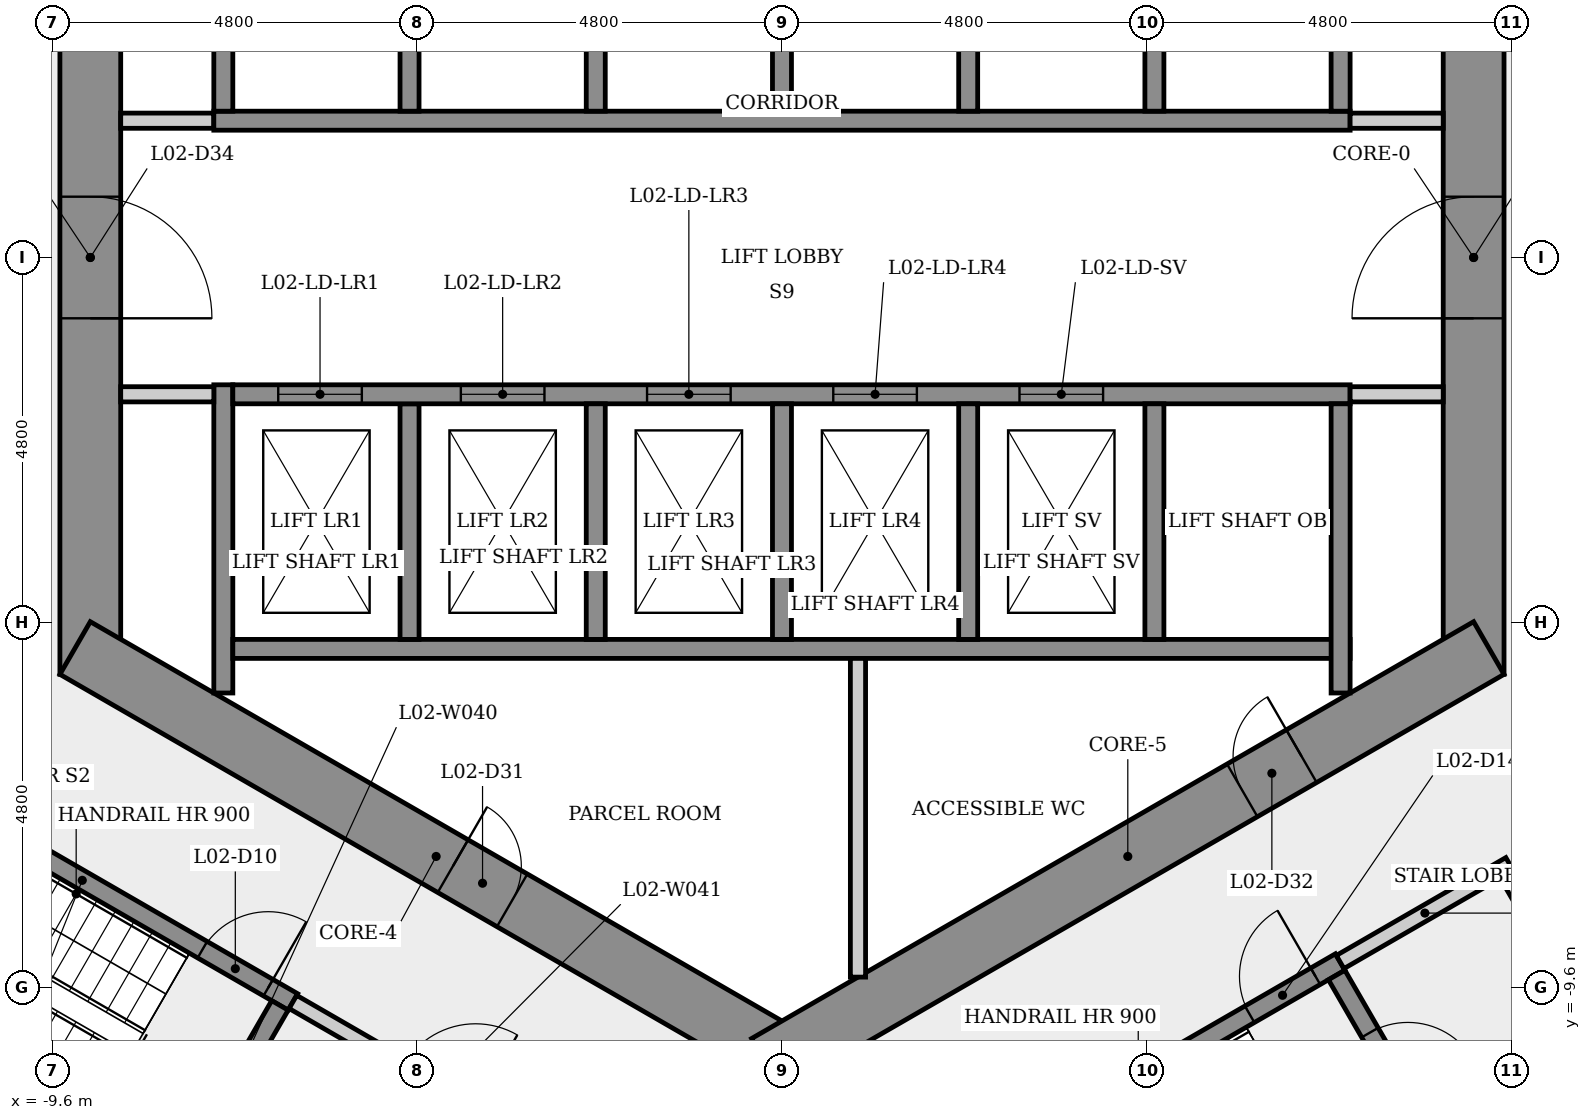
"""IFC4 building model, lengths in metres.
Left out: names, types, materials, properties, quantities, classifications, styles, units other than length and angle.
Written with IfcOpenShell. Run it as: python <this file> out.ifc"""

import sys

from ifc_helpers import new_model, si_unit, direction, frame, frame_2d, origin, place, context, subcontext, project, spatial, rectangle, extrude, element, fill, save


model = new_model("IFC4")
c1 = context("Model", 3, precision=1e-05, world=origin(), true_north=direction((0.0, 1.0)))
c2 = subcontext(c1, "Body", "Model", "MODEL_VIEW")
j1 = project(units=[si_unit("LENGTHUNIT", "METRE"), si_unit("PLANEANGLEUNIT", "RADIAN")], contexts=[c1])
p1 = place(None, origin())
s1 = spatial("IfcSite", under=j1, at=p1, CompositionType="ELEMENT")
p2 = place(p1, origin())
s2 = spatial("IfcBuilding", under=s1, at=p2, CompositionType="ELEMENT")
p3 = place(p2, frame((0.0, 0.0, 11.5)))
s3 = spatial("IfcBuildingStorey", under=s2, at=p3, CompositionType="ELEMENT", Elevation=11.5)
p4 = place(p3, frame((9.1, -5.485, 0.0), z_axis=(0.0, 0.0, 1.0), x_axis=(0.0, 1.0, 0.0)))
e1 = element("IfcWall", 1, at=p4, inside=s3, PredefinedType="SHEAR", context=c2, shape_type="SweptSolid", body=[
    extrude(rectangle(XDim=10.97, YDim=0.8, at=frame_2d((5.485, 0.0))), origin(), (0.0, 0.0, 1.0), 4.5),
])
p5 = place(p4, frame((4.685, 0.0, 0.0)))
e2 = element("IfcOpeningElement", 2, at=p5, cuts=e1, PredefinedType="OPENING", context=c2, shape_type="SweptSolid", body=[
    extrude(rectangle(XDim=1.6, YDim=2.1, at=frame_2d((0.8, 1.05))), frame((0.0, 0.41, 0.0), z_axis=(0.0, -1.0, 0.0), x_axis=(1.0, 0.0, 0.0)), (0.0, 0.0, 1.0), 0.82),
])
p6 = place(p3, frame((-9.1, 5.485, 0.0), z_axis=(0.0, 0.0, 1.0), x_axis=(0.0, -1.0, 0.0)))
e3 = element("IfcWall", 3, at=p6, inside=s3, PredefinedType="SHEAR", context=c2, shape_type="SweptSolid", body=[
    extrude(rectangle(XDim=10.97, YDim=0.8, at=frame_2d((5.485, 0.0))), origin(), (0.0, 0.0, 1.0), 4.5),
])
p7 = place(p6, frame((4.685, 0.0, 0.0)))
e4 = element("IfcOpeningElement", 4, at=p7, cuts=e3, PredefinedType="OPENING", context=c2, shape_type="SweptSolid", body=[
    extrude(rectangle(XDim=1.6, YDim=2.1, at=frame_2d((0.8, 1.05))), frame((0.0, 0.41, 0.0), z_axis=(0.0, -1.0, 0.0), x_axis=(1.0, 0.0, 0.0)), (0.0, 0.0, 1.0), 0.82),
])
p8 = place(p3, frame((-9.3, -5.138, 0.0), z_axis=(0.0, 0.0, 1.0), x_axis=(0.866023993627, -0.500002442456, 0.0)))
e5 = element("IfcWall", 5, at=p8, inside=s3, PredefinedType="SHEAR", context=c2, shape_type="SweptSolid", body=[
    extrude(rectangle(XDim=10.97, YDim=0.8, at=frame_2d((5.485, 0.0))), origin(), (0.0, 0.0, 1.0), 4.5),
])
p9 = place(p8, frame((5.74, 0.0, 0.0)))
e6 = element("IfcOpeningElement", 6, at=p9, cuts=e5, PredefinedType="OPENING", context=c2, shape_type="SweptSolid", body=[
    extrude(rectangle(XDim=0.9, YDim=2.1, at=frame_2d((0.45, 1.05))), frame((0.0, 0.41, 0.0), z_axis=(0.0, -1.0, 0.0), x_axis=(1.0, 0.0, 0.0)), (0.0, 0.0, 1.0), 0.82),
])
p10 = place(p3, frame((-0.2, -10.623, 0.0), z_axis=(0.0, 0.0, 1.0), x_axis=(0.866023993627, 0.500002442456, 0.0)))
e7 = element("IfcWall", 7, at=p10, inside=s3, PredefinedType="SHEAR", context=c2, shape_type="SweptSolid", body=[
    extrude(rectangle(XDim=10.97, YDim=0.8, at=frame_2d((5.485, 0.0))), origin(), (0.0, 0.0, 1.0), 4.5),
])
p11 = place(p10, frame((7.224, 0.0, 0.0)))
e8 = element("IfcOpeningElement", 8, at=p11, cuts=e7, PredefinedType="OPENING", context=c2, shape_type="SweptSolid", body=[
    extrude(rectangle(XDim=0.9, YDim=2.1, at=frame_2d((0.45, 1.05))), frame((0.0, 0.41, 0.0), z_axis=(0.0, -1.0, 0.0), x_axis=(1.0, 0.0, 0.0)), (0.0, 0.0, 1.0), 0.82),
])
p12 = place(p3, frame((-11.977, -6.595, 0.0), z_axis=(0.0, 0.0, 1.0), x_axis=(0.866025499775, -0.499999833739, 0.0)))
e9 = element("IfcWall", 9, at=p12, inside=s3, PredefinedType="SHEAR", context=c2, shape_type="SweptSolid", body=[
    extrude(rectangle(XDim=6.4, YDim=0.25, at=frame_2d((3.2, 0.0))), origin(), (0.0, 0.0, 1.0), 4.1),
])
p13 = place(p12, frame((5.025, 0.0, 0.0)))
e10 = element("IfcOpeningElement", 10, at=p13, cuts=e9, PredefinedType="OPENING", context=c2, shape_type="SweptSolid", body=[
    extrude(rectangle(XDim=1.0, YDim=2.1, at=frame_2d((0.5, 1.05))), frame((0.0, 0.135, 0.0), z_axis=(0.0, -1.0, 0.0), x_axis=(1.0, 0.0, 0.0)), (0.0, 0.0, 1.0), 0.27),
])
p14 = place(p3, frame((-8.7, 1.8, 0.0), z_axis=(0.0, 0.0, 1.0), x_axis=(1.0, 0.0, 0.0)))
e11 = element("IfcWall", 11, at=p14, inside=s3, PredefinedType="PARTITIONING", context=c2, shape_type="SweptSolid", body=[
    extrude(rectangle(XDim=1.225, YDim=0.2, at=frame_2d((0.613, 0.0))), origin(), (0.0, 0.0, 1.0), 4.1),
])
p15 = place(p3, frame((-7.935, -12.393, 0.0), z_axis=(0.0, 0.0, 1.0), x_axis=(-0.866025499775, 0.499999833739, 0.0)))
e12 = element("IfcWall", 12, at=p15, inside=s3, PredefinedType="SHEAR", context=c2, shape_type="SweptSolid", body=[
    extrude(rectangle(XDim=6.4, YDim=0.25, at=frame_2d((3.2, 0.0))), origin(), (0.0, 0.0, 1.0), 4.1),
])
p16 = place(p3, frame((-7.475, 1.8, 0.0), z_axis=(0.0, 0.0, 1.0), x_axis=(1.0, 0.0, 0.0)))
e13 = element("IfcWall", 13, at=p16, inside=s3, PredefinedType="SHEAR", context=c2, shape_type="SweptSolid", body=[
    extrude(rectangle(XDim=14.95, YDim=0.25, at=frame_2d((7.475, 0.0))), origin(), (0.0, 0.0, 1.0), 4.1),
])
p17 = place(p3, frame((-7.35, -5.73, 0.0), z_axis=(0.0, 0.0, 1.0), x_axis=(0.0, 1.0, 0.0)))
e14 = element("IfcWall", 14, at=p17, inside=s3, PredefinedType="SHEAR", context=c2, shape_type="SweptSolid", body=[
    extrude(rectangle(XDim=4.055, YDim=0.25, at=frame_2d((2.028, 0.0))), origin(), (0.0, 0.0, 1.0), 4.1),
])
p18 = place(p3, frame((-7.35, 1.925, 0.0), z_axis=(0.0, 0.0, 1.0), x_axis=(0.0, 1.0, 0.0)))
e15 = element("IfcWall", 15, at=p18, inside=s3, PredefinedType="SHEAR", context=c2, shape_type="SweptSolid", body=[
    extrude(rectangle(XDim=3.805, YDim=0.25, at=frame_2d((1.903, 0.0))), origin(), (0.0, 0.0, 1.0), 4.1),
])
p19 = place(p3, frame((-7.475, -1.8, 0.0), z_axis=(0.0, 0.0, 1.0), x_axis=(-1.0, 0.0, 0.0)))
e16 = element("IfcWall", 16, at=p19, inside=s3, PredefinedType="PARTITIONING", context=c2, shape_type="SweptSolid", body=[
    extrude(rectangle(XDim=1.225, YDim=0.2, at=frame_2d((0.613, 0.0))), origin(), (0.0, 0.0, 1.0), 4.1),
])
p20 = place(p3, frame((-6.605, -9.841, 0.0), z_axis=(0.0, 0.0, 1.0), x_axis=(-0.499996545922, -0.866027397988, 0.0)))
e17 = element("IfcWall", 17, at=p20, inside=s3, PredefinedType="SHEAR", context=c2, shape_type="SweptSolid", body=[
    extrude(rectangle(XDim=2.75, YDim=0.25, at=frame_2d((1.375, 0.0))), origin(), (0.0, 0.0, 1.0), 4.1),
])
p21 = place(p20, frame((0.875, 0.0, 0.0)))
e18 = element("IfcOpeningElement", 18, at=p21, cuts=e17, PredefinedType="OPENING", context=c2, shape_type="SweptSolid", body=[
    extrude(rectangle(XDim=1.0, YDim=2.1, at=frame_2d((0.5, 1.05))), frame((0.0, 0.135, 0.0), z_axis=(0.0, -1.0, 0.0), x_axis=(1.0, 0.0, 0.0)), (0.0, 0.0, 1.0), 0.27),
])
p22 = place(p3, frame((-6.435, -9.795, 0.0), z_axis=(0.0, 0.0, 1.0), x_axis=(0.866012907634, -0.500021643343, 0.0)))
e19 = element("IfcWall", 19, at=p22, inside=s3, PredefinedType="PARTITIONING", context=c2, shape_type="SweptSolid", body=[
    extrude(rectangle(XDim=4.45, YDim=0.2, at=frame_2d((2.225, 0.0))), origin(), (0.0, 0.0, 1.0), 4.1),
])
p23 = place(p22, frame((1.675, 0.0, 0.0)))
e20 = element("IfcOpeningElement", 20, at=p23, cuts=e19, PredefinedType="OPENING", context=c2, shape_type="SweptSolid", body=[
    extrude(rectangle(XDim=1.1, YDim=2.1, at=frame_2d((0.55, 1.05))), frame((0.0, 0.11, 0.0), z_axis=(0.0, -1.0, 0.0), x_axis=(1.0, 0.0, 0.0)), (0.0, 0.0, 1.0), 0.22),
])
p24 = place(p3, frame((-7.225, -5.15, 0.0), z_axis=(0.0, 0.0, 1.0), x_axis=(1.0, 0.0, 0.0)))
e21 = element("IfcWall", 21, at=p24, inside=s3, PredefinedType="SHEAR", context=c2, shape_type="SweptSolid", body=[
    extrude(rectangle(XDim=14.7, YDim=0.25, at=frame_2d((7.35, 0.0))), origin(), (0.0, 0.0, 1.0), 4.1),
])
for number, where, z_axis, x_axis in (
    (22, (-4.9, -1.925, 0.0), (0.0, 0.0, 1.0), (0.0, -1.0, 0.0)),
    (23, (-4.9, 5.025, 0.0), (0.0, 0.0, 1.0), (0.0, -1.0, 0.0)),
):
    element("IfcWall", number, at=place(p3, frame(where, z_axis=z_axis, x_axis=x_axis)), inside=s3, PredefinedType="SHEAR", context=c2, shape_type="SweptSolid", body=[
        extrude(rectangle(XDim=3.1, YDim=0.25, at=frame_2d((1.55, 0.0))), origin(), (0.0, 0.0, 1.0), 4.5),
    ])
p25 = place(p3, frame((-7.225, -1.8, 0.0), z_axis=(0.0, 0.0, 1.0), x_axis=(1.0, 0.0, 0.0)))
e24 = element("IfcWall", 24, at=p25, inside=s3, PredefinedType="SHEAR", context=c2, shape_type="SweptSolid", body=[
    extrude(rectangle(XDim=14.7, YDim=0.25, at=frame_2d((7.35, 0.0))), origin(), (0.0, 0.0, 1.0), 4.1),
])
p26 = place(p25, frame((0.597, 0.0, 0.0)))
e25 = element("IfcOpeningElement", 25, at=p26, cuts=e24, PredefinedType="OPENING", context=c2, shape_type="SweptSolid", body=[
    extrude(rectangle(XDim=1.1, YDim=2.1, at=frame_2d((0.55, 1.05))), frame((0.0, 0.135, 0.0), z_axis=(0.0, -1.0, 0.0), x_axis=(1.0, 0.0, 0.0)), (0.0, 0.0, 1.0), 0.27),
])
p27 = place(p25, frame((3.0, 0.0, 0.0)))
e26 = element("IfcOpeningElement", 26, at=p27, cuts=e24, PredefinedType="OPENING", context=c2, shape_type="SweptSolid", body=[
    extrude(rectangle(XDim=1.1, YDim=2.1, at=frame_2d((0.55, 1.05))), frame((0.0, 0.135, 0.0), z_axis=(0.0, -1.0, 0.0), x_axis=(1.0, 0.0, 0.0)), (0.0, 0.0, 1.0), 0.27),
])
p28 = place(p25, frame((5.45, 0.0, 0.0)))
e27 = element("IfcOpeningElement", 27, at=p28, cuts=e24, PredefinedType="OPENING", context=c2, shape_type="SweptSolid", body=[
    extrude(rectangle(XDim=1.1, YDim=2.1, at=frame_2d((0.55, 1.05))), frame((0.0, 0.135, 0.0), z_axis=(0.0, -1.0, 0.0), x_axis=(1.0, 0.0, 0.0)), (0.0, 0.0, 1.0), 0.27),
])
p29 = place(p25, frame((7.9, 0.0, 0.0)))
e28 = element("IfcOpeningElement", 28, at=p29, cuts=e24, PredefinedType="OPENING", context=c2, shape_type="SweptSolid", body=[
    extrude(rectangle(XDim=1.1, YDim=2.1, at=frame_2d((0.55, 1.05))), frame((0.0, 0.135, 0.0), z_axis=(0.0, -1.0, 0.0), x_axis=(1.0, 0.0, 0.0)), (0.0, 0.0, 1.0), 0.27),
])
p30 = place(p25, frame((10.35, 0.0, 0.0)))
e29 = element("IfcOpeningElement", 29, at=p30, cuts=e24, PredefinedType="OPENING", context=c2, shape_type="SweptSolid", body=[
    extrude(rectangle(XDim=1.1, YDim=2.1, at=frame_2d((0.55, 1.05))), frame((0.0, 0.135, 0.0), z_axis=(0.0, -1.0, 0.0), x_axis=(1.0, 0.0, 0.0)), (0.0, 0.0, 1.0), 0.27),
])
for number, where, z_axis, x_axis in (
    (30, (-2.45, -1.925, 0.0), (0.0, 0.0, 1.0), (0.0, -1.0, 0.0)),
    (31, (-2.45, 5.025, 0.0), (0.0, 0.0, 1.0), (0.0, -1.0, 0.0)),
    (32, (0.0, -1.925, 0.0), (0.0, 0.0, 1.0), (0.0, -1.0, 0.0)),
    (33, (0.0, 5.025, 0.0), (0.0, 0.0, 1.0), (0.0, -1.0, 0.0)),
):
    element("IfcWall", number, at=place(p3, frame(where, z_axis=z_axis, x_axis=x_axis)), inside=s3, PredefinedType="SHEAR", context=c2, shape_type="SweptSolid", body=[
        extrude(rectangle(XDim=3.1, YDim=0.25, at=frame_2d((1.55, 0.0))), origin(), (0.0, 0.0, 1.0), 4.5),
    ])
p31 = place(p3, frame((1.0, -5.275, 0.0), z_axis=(0.0, 0.0, 1.0), x_axis=(0.0, -1.0, 0.0)))
e34 = element("IfcWall", 34, at=p31, inside=s3, PredefinedType="PARTITIONING", context=c2, shape_type="SweptSolid", body=[
    extrude(rectangle(XDim=4.194, YDim=0.2, at=frame_2d((2.097, 0.0))), origin(), (0.0, 0.0, 1.0), 4.1),
])
p32 = place(p3, frame((1.585, -12.595, 0.0), z_axis=(0.0, 0.0, 1.0), x_axis=(0.866036417653, 0.499980922934, 0.0)))
e35 = element("IfcWall", 35, at=p32, inside=s3, PredefinedType="SHEAR", context=c2, shape_type="SweptSolid", body=[
    extrude(rectangle(XDim=6.65, YDim=0.25, at=frame_2d((3.325, 0.0))), origin(), (0.0, 0.0, 1.0), 4.1),
])
p33 = place(p32, frame((5.275, 0.0, 0.0)))
e36 = element("IfcOpeningElement", 36, at=p33, cuts=e35, PredefinedType="OPENING", context=c2, shape_type="SweptSolid", body=[
    extrude(rectangle(XDim=1.0, YDim=2.1, at=frame_2d((0.5, 1.05))), frame((0.0, 0.135, 0.0), z_axis=(0.0, -1.0, 0.0), x_axis=(1.0, 0.0, 0.0)), (0.0, 0.0, 1.0), 0.27),
])
for number, where, z_axis, x_axis in (
    (37, (2.45, -1.925, 0.0), (0.0, 0.0, 1.0), (0.0, -1.0, 0.0)),
    (38, (2.45, 5.025, 0.0), (0.0, 0.0, 1.0), (0.0, -1.0, 0.0)),
    (39, (4.9, -1.925, 0.0), (0.0, 0.0, 1.0), (0.0, -1.0, 0.0)),
    (40, (4.9, 5.025, 0.0), (0.0, 0.0, 1.0), (0.0, -1.0, 0.0)),
):
    element("IfcWall", number, at=place(p3, frame(where, z_axis=z_axis, x_axis=x_axis)), inside=s3, PredefinedType="SHEAR", context=c2, shape_type="SweptSolid", body=[
        extrude(rectangle(XDim=3.1, YDim=0.25, at=frame_2d((1.55, 0.0))), origin(), (0.0, 0.0, 1.0), 4.5),
    ])
p34 = place(p3, frame((7.298, -9.441, 0.0), z_axis=(0.0, 0.0, 1.0), x_axis=(0.500034990121, -0.866005201286, 0.0)))
e41 = element("IfcWall", 41, at=p34, inside=s3, PredefinedType="SHEAR", context=c2, shape_type="SweptSolid", body=[
    extrude(rectangle(XDim=2.75, YDim=0.25, at=frame_2d((1.375, 0.0))), origin(), (0.0, 0.0, 1.0), 4.1),
])
p35 = place(p34, frame((0.875, 0.0, 0.0)))
e42 = element("IfcOpeningElement", 42, at=p35, cuts=e41, PredefinedType="OPENING", context=c2, shape_type="SweptSolid", body=[
    extrude(rectangle(XDim=1.0, YDim=2.1, at=frame_2d((0.5, 1.05))), frame((0.0, 0.135, 0.0), z_axis=(0.0, -1.0, 0.0), x_axis=(1.0, 0.0, 0.0)), (0.0, 0.0, 1.0), 0.27),
])
p36 = place(p3, frame((7.344, -9.27, 0.0), z_axis=(0.0, 0.0, 1.0), x_axis=(0.866005588531, 0.500034319456, 0.0)))
e43 = element("IfcWall", 43, at=p36, inside=s3, PredefinedType="PARTITIONING", context=c2, shape_type="SweptSolid", body=[
    extrude(rectangle(XDim=2.575, YDim=0.2, at=frame_2d((1.288, 0.0))), origin(), (0.0, 0.0, 1.0), 4.1),
])
p37 = place(p3, frame((7.475, 1.8, 0.0), z_axis=(0.0, 0.0, 1.0), x_axis=(1.0, 0.0, 0.0)))
e44 = element("IfcWall", 44, at=p37, inside=s3, PredefinedType="PARTITIONING", context=c2, shape_type="SweptSolid", body=[
    extrude(rectangle(XDim=1.225, YDim=0.2, at=frame_2d((0.613, 0.0))), origin(), (0.0, 0.0, 1.0), 4.1),
])
for number, where, z_axis, x_axis in (
    (45, (7.35, -1.925, 0.0), (0.0, 0.0, 1.0), (0.0, -1.0, 0.0)),
    (46, (7.35, 5.73, 0.0), (0.0, 0.0, 1.0), (0.0, -1.0, 0.0)),
):
    element("IfcWall", number, at=place(p3, frame(where, z_axis=z_axis, x_axis=x_axis)), inside=s3, PredefinedType="SHEAR", context=c2, shape_type="SweptSolid", body=[
        extrude(rectangle(XDim=3.805, YDim=0.25, at=frame_2d((1.903, 0.0))), origin(), (0.0, 0.0, 1.0), 4.1),
    ])
p38 = place(p3, frame((8.7, -1.8, 0.0), z_axis=(0.0, 0.0, 1.0), x_axis=(-1.0, 0.0, 0.0)))
e47 = element("IfcWall", 47, at=p38, inside=s3, PredefinedType="PARTITIONING", context=c2, shape_type="SweptSolid", body=[
    extrude(rectangle(XDim=1.225, YDim=0.2, at=frame_2d((0.613, 0.0))), origin(), (0.0, 0.0, 1.0), 4.1),
])
p39 = place(p3, frame((9.537, -8.119, 0.0), z_axis=(0.0, 0.0, 1.0), x_axis=(0.499990139034, -0.866031096941, 0.0)))
e48 = element("IfcWall", 48, at=p39, inside=s3, PredefinedType="PARTITIONING", context=c2, shape_type="SweptSolid", body=[
    extrude(rectangle(XDim=3.0, YDim=0.2, at=frame_2d((1.5, 0.0))), origin(), (0.0, 0.0, 1.0), 4.1),
])
p40 = place(p39, frame((0.935, 0.0, 0.0)))
e49 = element("IfcOpeningElement", 49, at=p40, cuts=e48, PredefinedType="OPENING", context=c2, shape_type="SweptSolid", body=[
    extrude(rectangle(XDim=1.0, YDim=2.1, at=frame_2d((0.5, 1.05))), frame((0.0, 0.11, 0.0), z_axis=(0.0, -1.0, 0.0), x_axis=(1.0, 0.0, 0.0)), (0.0, 0.0, 1.0), 0.22),
])
p41 = place(p26, origin())
e50 = element("IfcDoor", 50, at=p41, inside=s3, OperationType="SLIDING_TO_LEFT", PredefinedType="DOOR", context=c2, shape_type="SweptSolid", body=[
    extrude(rectangle(XDim=1.1, YDim=2.1, at=frame_2d((0.55, 1.05))), frame((0.0, 0.025, 0.0), z_axis=(0.0, -1.0, 0.0), x_axis=(1.0, 0.0, 0.0)), (0.0, 0.0, 1.0), 0.05),
])
fill(e25, e50)
p42 = place(p27, origin())
e51 = element("IfcDoor", 51, at=p42, inside=s3, OperationType="SLIDING_TO_LEFT", PredefinedType="DOOR", context=c2, shape_type="SweptSolid", body=[
    extrude(rectangle(XDim=1.1, YDim=2.1, at=frame_2d((0.55, 1.05))), frame((0.0, 0.025, 0.0), z_axis=(0.0, -1.0, 0.0), x_axis=(1.0, 0.0, 0.0)), (0.0, 0.0, 1.0), 0.05),
])
fill(e26, e51)
p43 = place(p28, origin())
e52 = element("IfcDoor", 52, at=p43, inside=s3, OperationType="SLIDING_TO_LEFT", PredefinedType="DOOR", context=c2, shape_type="SweptSolid", body=[
    extrude(rectangle(XDim=1.1, YDim=2.1, at=frame_2d((0.55, 1.05))), frame((0.0, 0.025, 0.0), z_axis=(0.0, -1.0, 0.0), x_axis=(1.0, 0.0, 0.0)), (0.0, 0.0, 1.0), 0.05),
])
fill(e27, e52)
p44 = place(p29, origin())
e53 = element("IfcDoor", 53, at=p44, inside=s3, OperationType="SLIDING_TO_LEFT", PredefinedType="DOOR", context=c2, shape_type="SweptSolid", body=[
    extrude(rectangle(XDim=1.1, YDim=2.1, at=frame_2d((0.55, 1.05))), frame((0.0, 0.025, 0.0), z_axis=(0.0, -1.0, 0.0), x_axis=(1.0, 0.0, 0.0)), (0.0, 0.0, 1.0), 0.05),
])
fill(e28, e53)
p45 = place(p30, origin())
e54 = element("IfcDoor", 54, at=p45, inside=s3, OperationType="SLIDING_TO_LEFT", PredefinedType="DOOR", context=c2, shape_type="SweptSolid", body=[
    extrude(rectangle(XDim=1.1, YDim=2.1, at=frame_2d((0.55, 1.05))), frame((0.0, 0.025, 0.0), z_axis=(0.0, -1.0, 0.0), x_axis=(1.0, 0.0, 0.0)), (0.0, 0.0, 1.0), 0.05),
])
fill(e29, e54)
p46 = place(p13, origin())
e55 = element("IfcDoor", 55, at=p46, inside=s3, OperationType="SINGLE_SWING_RIGHT", PredefinedType="DOOR", context=c2, shape_type="SweptSolid", body=[
    extrude(rectangle(XDim=1.0, YDim=2.1, at=frame_2d((0.5, 1.05))), frame((0.0, 0.025, 0.0), z_axis=(0.0, -1.0, 0.0), x_axis=(1.0, 0.0, 0.0)), (0.0, 0.0, 1.0), 0.05),
])
fill(e10, e55)
p47 = place(p33, origin())
e56 = element("IfcDoor", 56, at=p47, inside=s3, OperationType="SINGLE_SWING_RIGHT", PredefinedType="DOOR", context=c2, shape_type="SweptSolid", body=[
    extrude(rectangle(XDim=1.0, YDim=2.1, at=frame_2d((0.5, 1.05))), frame((0.0, 0.025, 0.0), z_axis=(0.0, -1.0, 0.0), x_axis=(1.0, 0.0, 0.0)), (0.0, 0.0, 1.0), 0.05),
])
fill(e36, e56)
p48 = place(p35, origin())
e57 = element("IfcDoor", 57, at=p48, inside=s3, OperationType="SINGLE_SWING_RIGHT", PredefinedType="DOOR", context=c2, shape_type="SweptSolid", body=[
    extrude(rectangle(XDim=1.0, YDim=2.1, at=frame_2d((0.5, 1.05))), frame((0.0, 0.025, 0.0), z_axis=(0.0, -1.0, 0.0), x_axis=(1.0, 0.0, 0.0)), (0.0, 0.0, 1.0), 0.05),
])
fill(e42, e57)
p49 = place(p9, origin())
e58 = element("IfcDoor", 58, at=p49, inside=s3, OperationType="SINGLE_SWING_LEFT", PredefinedType="DOOR", context=c2, shape_type="SweptSolid", body=[
    extrude(rectangle(XDim=0.9, YDim=2.1, at=frame_2d((0.45, 1.05))), frame((0.0, 0.025, 0.0), z_axis=(0.0, -1.0, 0.0), x_axis=(1.0, 0.0, 0.0)), (0.0, 0.0, 1.0), 0.05),
])
fill(e6, e58)
p50 = place(p11, origin())
e59 = element("IfcDoor", 59, at=p50, inside=s3, OperationType="SINGLE_SWING_RIGHT", PredefinedType="DOOR", context=c2, shape_type="SweptSolid", body=[
    extrude(rectangle(XDim=0.9, YDim=2.1, at=frame_2d((0.45, 1.05))), frame((0.0, 0.025, 0.0), z_axis=(0.0, -1.0, 0.0), x_axis=(1.0, 0.0, 0.0)), (0.0, 0.0, 1.0), 0.05),
])
fill(e8, e59)
p51 = place(p5, origin())
e60 = element("IfcDoor", 60, at=p51, inside=s3, OperationType="SINGLE_SWING_LEFT", PredefinedType="DOOR", context=c2, shape_type="SweptSolid", body=[
    extrude(rectangle(XDim=1.6, YDim=2.1, at=frame_2d((0.8, 1.05))), frame((0.0, 0.025, 0.0), z_axis=(0.0, -1.0, 0.0), x_axis=(1.0, 0.0, 0.0)), (0.0, 0.0, 1.0), 0.05),
])
fill(e2, e60)
p52 = place(p7, origin())
e61 = element("IfcDoor", 61, at=p52, inside=s3, OperationType="SINGLE_SWING_RIGHT", PredefinedType="DOOR", context=c2, shape_type="SweptSolid", body=[
    extrude(rectangle(XDim=1.6, YDim=2.1, at=frame_2d((0.8, 1.05))), frame((0.0, 0.025, 0.0), z_axis=(0.0, -1.0, 0.0), x_axis=(1.0, 0.0, 0.0)), (0.0, 0.0, 1.0), 0.05),
])
fill(e4, e61)
save(model, sys.argv[1])
